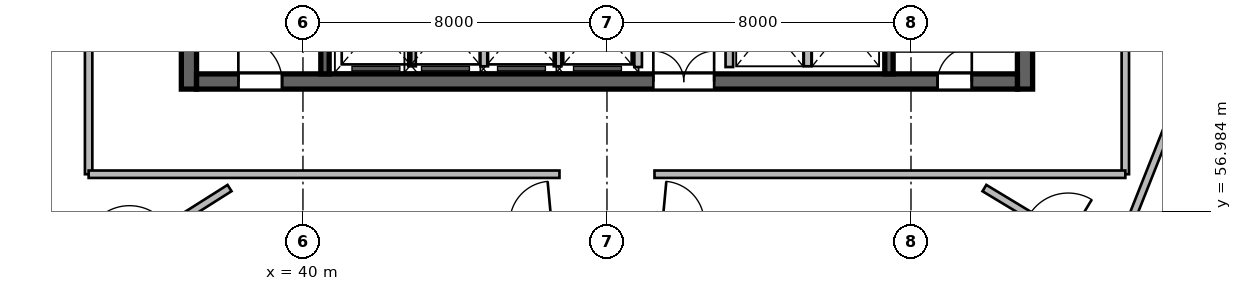
"""IFC4 building model, lengths in metres.
Left out: names, types, materials, properties, quantities, classifications, styles, units other than length and angle.
Written with IfcOpenShell. Run it as: python <this file> out.ifc"""

import sys

from ifc_helpers import new_model, si_unit, direction, frame, frame_2d, origin, place, context, subcontext, project, spatial, rectangle, extrude, source, transform, mapped, element, fill, save


model = new_model("IFC4")
c1 = context("Model", 3, precision=1e-05, world=origin(), true_north=direction((0.0, 1.0)))
c2 = subcontext(c1, "Body", "Model", "MODEL_VIEW")
j1 = project(units=[si_unit("LENGTHUNIT", "METRE"), si_unit("PLANEANGLEUNIT", "RADIAN")], contexts=[c1])
p1 = place(None, origin())
s1 = spatial("IfcSite", under=j1, at=p1, CompositionType="ELEMENT")
p2 = place(p1, origin())
s2 = spatial("IfcBuilding", under=s1, at=p2, CompositionType="ELEMENT")
p3 = place(p2, frame((0.0, 0.0, 287.4)))
s3 = spatial("IfcBuildingStorey", under=s2, at=p3, CompositionType="ELEMENT", Elevation=287.4)
m1 = source(origin(), c2, "Body", "SweptSolid", [
    extrude(rectangle(XDim=12.0, YDim=0.4, at=frame_2d((6.0, 0.0))), origin(), (0.0, 0.0, 1.0), 3.9),
])
for number, where, z_axis, x_axis in (
    (1, (37.0, 60.2, 0.0), (0.0, 0.0, 1.0), (0.0, 1.0, 0.0)),
    (2, (59.0, 60.2, 0.0), (0.0, 0.0, 1.0), (0.0, 1.0, 0.0)),
):
    element("IfcWall", number, at=place(p3, frame(where, z_axis=z_axis, x_axis=x_axis)), inside=s3, PredefinedType="SHEAR", context=c2, shape_type="MappedRepresentation", body=[
        mapped(m1, transform((0.0, 0.0, 0.0), scale=1.0)),
    ])
m2 = source(origin(), c2, "Body", "SweptSolid", [
    extrude(rectangle(XDim=21.6, YDim=0.4, at=frame_2d((10.8, 0.0))), origin(), (0.0, 0.0, 1.0), 3.9),
])
p4 = place(p3, frame((37.2, 60.4, 0.0), z_axis=(0.0, 0.0, 1.0), x_axis=(1.0, 0.0, 0.0)))
e3 = element("IfcWall", 3, at=p4, inside=s3, PredefinedType="SHEAR", context=c2, shape_type="MappedRepresentation", body=[
    mapped(m2, transform((0.0, 0.0, 0.0), scale=1.0)),
])
p5 = place(p4, frame((1.1, 0.0, 0.0)))
e4 = element("IfcOpeningElement", 4, at=p5, cuts=e3, PredefinedType="OPENING", context=c2, shape_type="SweptSolid", body=[
    extrude(rectangle(XDim=1.15, YDim=2.15, at=frame_2d((0.575, 1.075))), frame((0.0, 0.21, 0.0), z_axis=(0.0, -1.0, 0.0), x_axis=(1.0, 0.0, 0.0)), (0.0, 0.0, 1.0), 0.42),
])
p6 = place(p4, frame((19.5, 0.0, 0.0)))
e5 = element("IfcOpeningElement", 5, at=p6, cuts=e3, PredefinedType="OPENING", context=c2, shape_type="SweptSolid", body=[
    extrude(rectangle(XDim=0.9, YDim=2.1, at=frame_2d((0.45, 1.05))), frame((0.0, 0.21, 0.0), z_axis=(0.0, -1.0, 0.0), x_axis=(1.0, 0.0, 0.0)), (0.0, 0.0, 1.0), 0.42),
])
p7 = place(p4, frame((12.02, 0.0, 0.0)))
e6 = element("IfcOpeningElement", 6, at=p7, cuts=e3, PredefinedType="OPENING", context=c2, shape_type="SweptSolid", body=[
    extrude(rectangle(XDim=1.6, YDim=2.15, at=frame_2d((0.8, 1.075))), frame((0.0, 0.21, 0.0), z_axis=(0.0, -1.0, 0.0), x_axis=(1.0, 0.0, 0.0)), (0.0, 0.0, 1.0), 0.42),
])
m3 = source(origin(), c2, "Body", "SweptSolid", [
    extrude(rectangle(XDim=11.2, YDim=0.22, at=frame_2d((5.6, 0.0))), origin(), (0.0, 0.0, 1.0), 3.9),
])
p8 = place(p3, frame((40.58, 60.6, 0.0), z_axis=(0.0, 0.0, 1.0), x_axis=(0.0, 1.0, 0.0)))
e7 = element("IfcWall", 7, at=p8, inside=s3, PredefinedType="SHEAR", context=c2, shape_type="MappedRepresentation", body=[
    mapped(m3, transform((0.0, 0.0, 0.0), scale=1.0)),
])
p9 = place(p3, frame((55.42, 60.6, 0.0), z_axis=(0.0, 0.0, 1.0), x_axis=(0.0, 1.0, 0.0)))
e8 = element("IfcWall", 8, at=p9, inside=s3, PredefinedType="SHEAR", context=c2, shape_type="MappedRepresentation", body=[
    mapped(m3, transform((0.0, 0.0, 0.0), scale=1.0)),
])
p10 = place(p9, frame((9.645, 0.0, 0.0)))
e9 = element("IfcOpeningElement", 9, at=p10, cuts=e8, PredefinedType="OPENING", context=c2, shape_type="SweptSolid", body=[
    extrude(rectangle(XDim=1.15, YDim=2.15, at=frame_2d((0.575, 1.075))), frame((0.0, 0.12, 0.0), z_axis=(0.0, -1.0, 0.0), x_axis=(1.0, 0.0, 0.0)), (0.0, 0.0, 1.0), 0.24),
])
m4 = source(origin(), c2, "Body", "SweptSolid", [
    extrude(rectangle(XDim=2.24, YDim=0.2, at=frame_2d((1.12, 0.0))), origin(), (0.0, 0.0, 1.0), 3.64),
])
for number, where, z_axis, x_axis in (
    (10, (48.82, 60.78, 0.0), (0.0, 0.0, 1.0), (0.0, 1.0, 0.0)),
    (11, (51.22, 60.78, 0.0), (0.0, 0.0, 1.0), (0.0, 1.0, 0.0)),
):
    element("IfcWall", number, at=place(p3, frame(where, z_axis=z_axis, x_axis=x_axis)), inside=s3, PredefinedType="SOLIDWALL", context=c2, shape_type="MappedRepresentation", body=[
        mapped(m4, transform((0.0, 0.0, 0.0), scale=1.0)),
    ])
m5 = source(origin(), c2, "Body", "SweptSolid", [
    extrude(rectangle(XDim=2.2, YDim=0.2, at=frame_2d((1.1, 0.0))), origin(), (0.0, 0.0, 1.0), 3.64),
])
for number, where, z_axis, x_axis in (
    (12, (42.87, 60.8, 0.0), (0.0, 0.0, 1.0), (0.0, 1.0, 0.0)),
    (13, (44.77, 60.8, 0.0), (0.0, 0.0, 1.0), (0.0, 1.0, 0.0)),
    (14, (46.7, 60.8, 0.0), (0.0, 0.0, 1.0), (0.0, 1.0, 0.0)),
    (15, (53.28, 60.8, 0.0), (0.0, 0.0, 1.0), (0.0, 1.0, 0.0)),
):
    element("IfcWall", number, at=place(p3, frame(where, z_axis=z_axis, x_axis=x_axis)), inside=s3, PredefinedType="SOLIDWALL", context=c2, shape_type="MappedRepresentation", body=[
        mapped(m5, transform((0.0, 0.0, 0.0), scale=1.0)),
    ])
m6 = source(origin(), c2, "Body", "SweptSolid", [
    extrude(rectangle(XDim=17.556, YDim=0.195, at=frame_2d((8.778, 0.0))), origin(), (0.0, 0.0, 1.0), 3.64),
])
p11 = place(p3, frame((33.8, 54.958, 0.0), z_axis=(0.0, 0.0, 1.0), x_axis=(-0.395687598313, 0.918385172213, 0.0)))
e16 = element("IfcWall", 16, at=p11, inside=s3, PredefinedType="PARTITIONING", context=c2, shape_type="MappedRepresentation", body=[
    mapped(m6, transform((0.0, 0.0, 0.0), scale=1.0)),
])
m7 = source(origin(), c2, "Body", "SweptSolid", [
    extrude(rectangle(XDim=5.025, YDim=0.195, at=frame_2d((2.513, 0.0))), origin(), (0.0, 0.0, 1.0), 3.64),
])
p12 = place(p3, frame((33.82, 54.911, 0.0), z_axis=(0.0, 0.0, 1.0), x_axis=(0.84532378062, 0.534254345717, 0.0)))
e17 = element("IfcWall", 17, at=p12, inside=s3, PredefinedType="PARTITIONING", context=c2, shape_type="MappedRepresentation", body=[
    mapped(m7, transform((0.0, 0.0, 0.0), scale=1.0)),
])
p13 = place(p12, frame((1.913, 0.0, 0.0)))
e18 = element("IfcOpeningElement", 18, at=p13, cuts=e17, PredefinedType="OPENING", context=c2, shape_type="SweptSolid", body=[
    extrude(rectangle(XDim=1.2, YDim=2.15, at=frame_2d((0.6, 1.075))), frame((0.0, 0.107, 0.0), z_axis=(0.0, -1.0, 0.0), x_axis=(1.0, 0.0, 0.0)), (0.0, 0.0, 1.0), 0.215),
])
m8 = source(origin(), c2, "Body", "SweptSolid", [
    extrude(rectangle(XDim=17.681, YDim=0.195, at=frame_2d((8.84, 0.0))), origin(), (0.0, 0.0, 1.0), 3.64),
])
p14 = place(p3, frame((34.36, 57.96, 0.0), z_axis=(0.0, 0.0, 1.0), x_axis=(0.0, 1.0, 0.0)))
e19 = element("IfcWall", 19, at=p14, inside=s3, PredefinedType="PARTITIONING", context=c2, shape_type="MappedRepresentation", body=[
    mapped(m8, transform((0.0, 0.0, 0.0), scale=1.0)),
])
m9 = source(origin(), c2, "Body", "SweptSolid", [
    extrude(rectangle(XDim=3.951, YDim=0.195, at=frame_2d((1.975, 0.0))), origin(), (0.0, 0.0, 1.0), 3.64),
])
p15 = place(p3, frame((57.932, 57.596, 0.0), z_axis=(0.0, 0.0, 1.0), x_axis=(0.856137696849, -0.51674775668, 0.0)))
e20 = element("IfcWall", 20, at=p15, inside=s3, PredefinedType="PARTITIONING", context=c2, shape_type="MappedRepresentation", body=[
    mapped(m9, transform((0.0, 0.0, 0.0), scale=1.0)),
])
p16 = place(p15, frame((1.375, 0.0, 0.0)))
e21 = element("IfcOpeningElement", 21, at=p16, cuts=e20, PredefinedType="OPENING", context=c2, shape_type="SweptSolid", body=[
    extrude(rectangle(XDim=1.2, YDim=2.15, at=frame_2d((0.6, 1.075))), frame((0.0, 0.107, 0.0), z_axis=(0.0, -1.0, 0.0), x_axis=(1.0, 0.0, 0.0)), (0.0, 0.0, 1.0), 0.215),
])
m10 = source(origin(), c2, "Body", "SweptSolid", [
    extrude(rectangle(XDim=17.664, YDim=0.195, at=frame_2d((8.832, 0.0))), origin(), (0.0, 0.0, 1.0), 3.64),
])
p17 = place(p3, frame((61.333, 55.602, 0.0), z_axis=(0.0, 0.0, 1.0), x_axis=(0.368827513738, 0.929497856431, 0.0)))
e22 = element("IfcWall", 22, at=p17, inside=s3, PredefinedType="PARTITIONING", context=c2, shape_type="MappedRepresentation", body=[
    mapped(m10, transform((0.0, 0.0, 0.0), scale=1.0)),
])
m11 = source(origin(), c2, "Body", "SweptSolid", [
    extrude(rectangle(XDim=17.693, YDim=0.195, at=frame_2d((8.847, 0.0))), origin(), (0.0, 0.0, 1.0), 3.64),
])
p18 = place(p3, frame((61.64, 57.96, 0.0), z_axis=(0.0, 0.0, 1.0), x_axis=(0.0, 1.0, 0.0)))
e23 = element("IfcWall", 23, at=p18, inside=s3, PredefinedType="PARTITIONING", context=c2, shape_type="MappedRepresentation", body=[
    mapped(m11, transform((0.0, 0.0, 0.0), scale=1.0)),
])
m12 = source(origin(), c2, "Body", "SweptSolid", [
    extrude(rectangle(XDim=12.39, YDim=0.195, at=frame_2d((6.195, 0.0))), origin(), (0.0, 0.0, 1.0), 3.64),
])
for number, where, z_axis, x_axis in (
    (24, (34.36, 57.96, 0.0), (0.0, 0.0, 1.0), (1.0, 0.0, 0.0)),
    (25, (49.25, 57.96, 0.0), (0.0, 0.0, 1.0), (1.0, 0.0, 0.0)),
):
    element("IfcWall", number, at=place(p3, frame(where, z_axis=z_axis, x_axis=x_axis)), inside=s3, PredefinedType="PARTITIONING", context=c2, shape_type="MappedRepresentation", body=[
        mapped(m12, transform((0.0, 0.0, 0.0), scale=1.0)),
    ])
m13 = source(origin(), c2, "Body", "SweptSolid", [
    extrude(rectangle(XDim=1.15, YDim=2.15, at=frame_2d((0.575, 1.075))), frame((0.0, 0.025, 0.0), z_axis=(0.0, -1.0, 0.0), x_axis=(1.0, 0.0, 0.0)), (0.0, 0.0, 1.0), 0.05),
])
p19 = place(p5, origin())
e26 = element("IfcDoor", 26, at=p19, inside=s3, OperationType="SINGLE_SWING_LEFT", PredefinedType="DOOR", context=c2, shape_type="MappedRepresentation", body=[
    mapped(m13, transform((0.0, 0.0, 0.0), scale=1.0)),
])
fill(e4, e26)
m14 = source(origin(), c2, "Body", "SweptSolid", [
    extrude(rectangle(XDim=0.9, YDim=2.1, at=frame_2d((0.45, 1.05))), frame((0.0, 0.025, 0.0), z_axis=(0.0, -1.0, 0.0), x_axis=(1.0, 0.0, 0.0)), (0.0, 0.0, 1.0), 0.05),
])
p20 = place(p6, origin())
e27 = element("IfcDoor", 27, at=p20, inside=s3, OperationType="SINGLE_SWING_RIGHT", PredefinedType="DOOR", context=c2, shape_type="MappedRepresentation", body=[
    mapped(m14, transform((0.0, 0.0, 0.0), scale=1.0)),
])
fill(e5, e27)
m15 = source(origin(), c2, "Body", "SweptSolid", [
    extrude(rectangle(XDim=1.6, YDim=2.15, at=frame_2d((0.8, 1.075))), frame((0.0, 0.025, 0.0), z_axis=(0.0, -1.0, 0.0), x_axis=(1.0, 0.0, 0.0)), (0.0, 0.0, 1.0), 0.05),
])
p21 = place(p7, origin())
e28 = element("IfcDoor", 28, at=p21, inside=s3, OperationType="DOUBLE_DOOR_SINGLE_SWING", PredefinedType="DOOR", context=c2, shape_type="MappedRepresentation", body=[
    mapped(m15, transform((0.0, 0.0, 0.0), scale=1.0)),
])
fill(e6, e28)
save(model, sys.argv[1])
